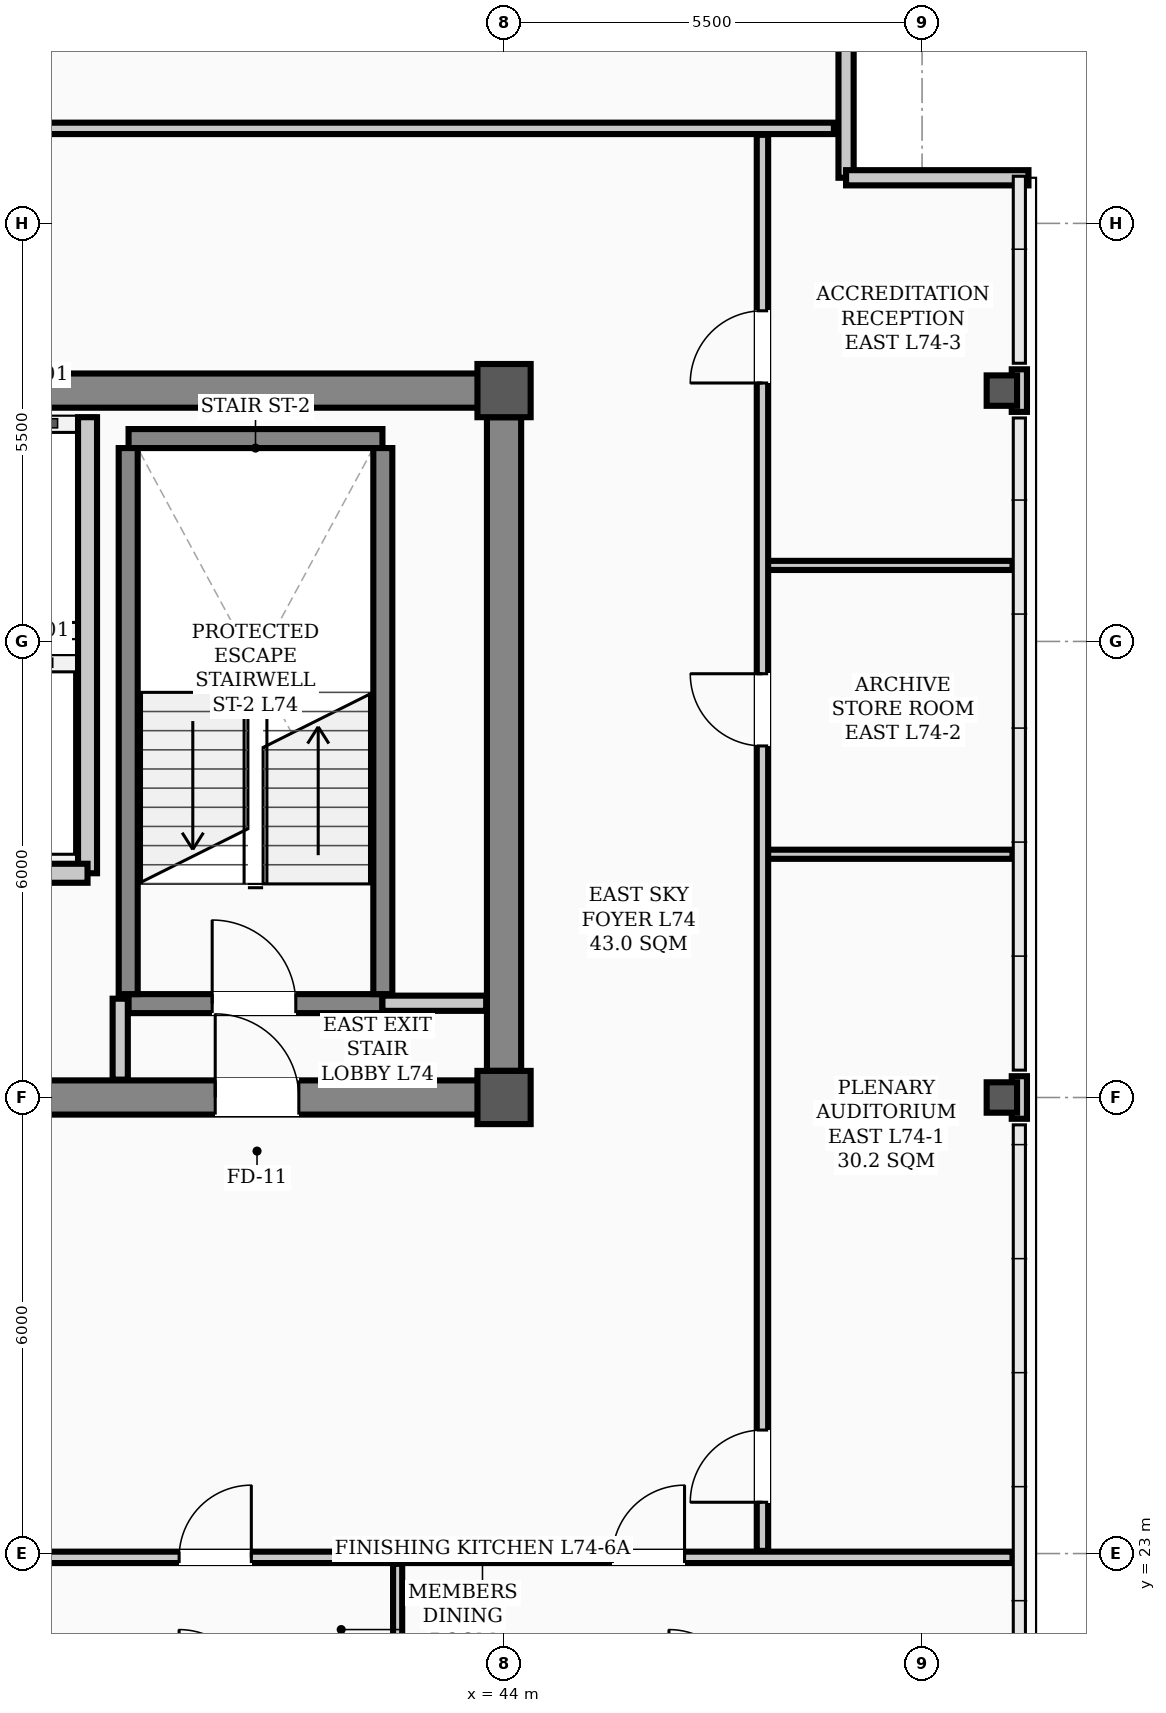
"""IFC4 building model, lengths in metres.
Left out: names, types, materials, properties, quantities, classifications, styles, units other than length and angle.
Written with IfcOpenShell. Run it as: python <this file> out.ifc"""

import sys

from ifc_helpers import new_model, si_unit, direction, frame, frame_2d, origin, origin_2d, place, context, subcontext, project, spatial, rectangle, hollow_rectangle, extrude, element, fill, save


model = new_model("IFC4")
c1 = context("Model", 3, precision=1e-05, world=origin(), true_north=direction((0.0, 1.0)))
c2 = subcontext(c1, "Body", "Model", "MODEL_VIEW")
j1 = project(units=[si_unit("LENGTHUNIT", "METRE"), si_unit("PLANEANGLEUNIT", "RADIAN")], contexts=[c1])
p1 = place(None, origin())
s1 = spatial("IfcSite", under=j1, at=p1, CompositionType="ELEMENT")
p2 = place(p1, origin())
s2 = spatial("IfcBuilding", under=s1, at=p2, CompositionType="ELEMENT")
p3 = place(p2, frame((0.0, 0.0, 296.9)))
s3 = spatial("IfcBuildingStorey", under=s2, at=p3, CompositionType="ELEMENT", Elevation=296.9)
for number, where, z_axis, x_axis in (
    (1, (44.0, 29.0, 0.0), (0.0, 0.0, 1.0), (1.0, 0.0, 0.0)),
    (2, (44.0, 38.3, 0.0), (0.0, 0.0, 1.0), (1.0, 0.0, 0.0)),
):
    element("IfcColumn", number, at=place(p3, frame(where, z_axis=z_axis, x_axis=x_axis)), inside=s3, PredefinedType="COLUMN", context=c2, shape_type="SweptSolid", body=[
        extrude(hollow_rectangle(XDim=0.7, YDim=0.7, WallThickness=0.028, InnerFilletRadius=0.014, OuterFilletRadius=0.042, at=origin_2d()), origin(), (0.0, 0.0, 1.0), 3.9),
    ])
for number, where, z_axis, x_axis in (
    (3, (50.55, 29.0, 0.0), (0.0, 0.0, 1.0), (1.0, 0.0, 0.0)),
    (4, (50.55, 38.3, 0.0), (0.0, 0.0, 1.0), (1.0, 0.0, 0.0)),
):
    element("IfcColumn", number, at=place(p3, frame(where, z_axis=z_axis, x_axis=x_axis)), inside=s3, PredefinedType="COLUMN", context=c2, shape_type="SweptSolid", body=[
        extrude(hollow_rectangle(XDim=0.4, YDim=0.4, WallThickness=0.02, InnerFilletRadius=0.02, OuterFilletRadius=0.04, at=origin_2d()), origin(), (0.0, 0.0, 1.0), 3.9),
    ])
for number, where, z_axis, x_axis in (
    (5, (50.78, 28.72, 0.0), (0.0, 0.0, 1.0), (0.0, 1.0, 0.0)),
    (6, (50.78, 38.02, 0.0), (0.0, 0.0, 1.0), (0.0, 1.0, 0.0)),
):
    element("IfcWall", number, at=place(p3, frame(where, z_axis=z_axis, x_axis=x_axis)), inside=s3, PredefinedType="PARAPET", context=c2, shape_type="SweptSolid", body=[
        extrude(rectangle(XDim=0.56, YDim=0.2, at=frame_2d((0.28, 0.0))), origin(), (0.0, 0.0, 1.0), 1.2),
    ])
for number, where, z_axis, x_axis in (
    (7, (48.5, 43.5, 0.0), (0.0, 0.0, 1.0), (0.0, -1.0, 0.0)),
    (8, (48.5, 41.1, 0.0), (0.0, 0.0, 1.0), (1.0, 0.0, 0.0)),
):
    element("IfcWall", number, at=place(p3, frame(where, z_axis=z_axis, x_axis=x_axis)), inside=s3, PredefinedType="PARAPET", context=c2, shape_type="SweptSolid", body=[
        extrude(rectangle(XDim=2.4, YDim=0.2, at=frame_2d((1.2, 0.0))), origin(), (0.0, 0.0, 1.0), 1.2),
    ])
p4 = place(p3, frame((13.5, 29.0, 0.0), z_axis=(0.0, 0.0, 1.0), x_axis=(1.0, 0.0, 0.0)))
e9 = element("IfcWall", 9, at=p4, inside=s3, PredefinedType="SHEAR", context=c2, shape_type="SweptSolid", body=[
    extrude(rectangle(XDim=30.5, YDim=0.45, at=frame_2d((15.25, 0.0))), origin(), (0.0, 0.0, 1.0), 3.72),
])
p5 = place(p4, frame((1.75, 0.0, 0.0)))
e10 = element("IfcOpeningElement", 10, at=p5, cuts=e9, PredefinedType="OPENING", context=c2, shape_type="SweptSolid", body=[
    extrude(rectangle(XDim=1.1, YDim=2.08, at=frame_2d((0.55, 1.04))), frame((0.0, 0.235, 0.0), z_axis=(0.0, -1.0, 0.0), x_axis=(1.0, 0.0, 0.0)), (0.0, 0.0, 1.0), 0.47),
])
p6 = place(p4, frame((26.7, 0.0, 0.0)))
e11 = element("IfcOpeningElement", 11, at=p6, cuts=e9, PredefinedType="OPENING", context=c2, shape_type="SweptSolid", body=[
    extrude(rectangle(XDim=1.1, YDim=2.08, at=frame_2d((0.55, 1.04))), frame((0.0, 0.235, 0.0), z_axis=(0.0, -1.0, 0.0), x_axis=(1.0, 0.0, 0.0)), (0.0, 0.0, 1.0), 0.47),
])
p7 = place(p4, frame((6.8, 0.0, 0.0)))
e12 = element("IfcOpeningElement", 12, at=p7, cuts=e9, PredefinedType="OPENING", context=c2, shape_type="SweptSolid", body=[
    extrude(rectangle(XDim=1.1, YDim=2.08, at=frame_2d((0.55, 1.04))), frame((0.0, 0.235, 0.0), z_axis=(0.0, -1.0, 0.0), x_axis=(1.0, 0.0, 0.0)), (0.0, 0.0, 1.0), 0.47),
])
p8 = place(p4, frame((13.2, 0.0, 0.0)))
e13 = element("IfcOpeningElement", 13, at=p8, cuts=e9, PredefinedType="OPENING", context=c2, shape_type="SweptSolid", body=[
    extrude(rectangle(XDim=1.6, YDim=2.08, at=frame_2d((0.8, 1.04))), frame((0.0, 0.235, 0.0), z_axis=(0.0, -1.0, 0.0), x_axis=(1.0, 0.0, 0.0)), (0.0, 0.0, 1.0), 0.47),
])
p9 = place(p4, frame((20.525, 0.0, 0.0)))
e14 = element("IfcOpeningElement", 14, at=p9, cuts=e9, PredefinedType="OPENING", context=c2, shape_type="SweptSolid", body=[
    extrude(rectangle(XDim=0.95, YDim=2.08, at=frame_2d((0.475, 1.04))), frame((0.0, 0.235, 0.0), z_axis=(0.0, -1.0, 0.0), x_axis=(1.0, 0.0, 0.0)), (0.0, 0.0, 1.0), 0.47),
])
p10 = place(p3, frame((13.5, 38.3, 0.0), z_axis=(0.0, 0.0, 1.0), x_axis=(1.0, 0.0, 0.0)))
e15 = element("IfcWall", 15, at=p10, inside=s3, PredefinedType="SHEAR", context=c2, shape_type="SweptSolid", body=[
    extrude(rectangle(XDim=30.5, YDim=0.45, at=frame_2d((15.25, 0.0))), origin(), (0.0, 0.0, 1.0), 3.72),
])
p11 = place(p3, frame((44.0, 29.35, 0.0), z_axis=(0.0, 0.0, 1.0), x_axis=(0.0, 1.0, 0.0)))
e16 = element("IfcWall", 16, at=p11, inside=s3, PredefinedType="SHEAR", context=c2, shape_type="SweptSolid", body=[
    extrude(rectangle(XDim=8.6, YDim=0.45, at=frame_2d((4.3, 0.0))), origin(), (0.0, 0.0, 1.0), 3.72),
])
p12 = place(p3, frame((39.06, 30.235, 0.0), z_axis=(0.0, 0.0, 1.0), x_axis=(1.0, 0.0, 0.0)))
e17 = element("IfcWall", 17, at=p12, inside=s3, PredefinedType="STANDARD", context=c2, shape_type="SweptSolid", body=[
    extrude(rectangle(XDim=3.34, YDim=0.25, at=frame_2d((1.67, 0.0))), origin(), (0.0, 0.0, 1.0), 3.72),
])
p13 = place(p12, frame((1.1, 0.0, 0.0)))
e18 = element("IfcOpeningElement", 18, at=p13, cuts=e17, PredefinedType="OPENING", context=c2, shape_type="SweptSolid", body=[
    extrude(rectangle(XDim=1.1, YDim=2.08, at=frame_2d((0.55, 1.04))), frame((0.0, 0.135, 0.0), z_axis=(0.0, -1.0, 0.0), x_axis=(1.0, 0.0, 0.0)), (0.0, 0.0, 1.0), 0.27),
])
p14 = place(p3, frame((39.06, 37.669, 0.0), z_axis=(0.0, 0.0, 1.0), x_axis=(1.0, 0.0, 0.0)))
e19 = element("IfcWall", 19, at=p14, inside=s3, PredefinedType="STANDARD", context=c2, shape_type="SweptSolid", body=[
    extrude(rectangle(XDim=3.34, YDim=0.25, at=frame_2d((1.67, 0.0))), origin(), (0.0, 0.0, 1.0), 3.72),
])
for number, where, z_axis, x_axis in (
    (20, (39.055, 30.36, 0.0), (0.0, 0.0, 1.0), (0.0, 1.0, 0.0)),
    (21, (42.405, 30.36, 0.0), (0.0, 0.0, 1.0), (0.0, 1.0, 0.0)),
):
    element("IfcWall", number, at=place(p3, frame(where, z_axis=z_axis, x_axis=x_axis)), inside=s3, PredefinedType="STANDARD", context=c2, shape_type="SweptSolid", body=[
        extrude(rectangle(XDim=7.184, YDim=0.25, at=frame_2d((3.592, 0.0))), origin(), (0.0, 0.0, 1.0), 3.72),
    ])
p15 = place(p3, frame((38.52, 31.95, 0.0), z_axis=(0.0, 0.0, 1.0), x_axis=(0.0, 1.0, 0.0)))
e22 = element("IfcWall", 22, at=p15, inside=s3, PredefinedType="STANDARD", context=c2, shape_type="SweptSolid", body=[
    extrude(rectangle(XDim=6.0, YDim=0.25, at=frame_2d((3.0, 0.0))), origin(), (0.0, 0.0, 1.0), 3.4),
])
p16 = place(p3, frame((36.62, 31.95, 0.0), z_axis=(0.0, 0.0, 1.0), x_axis=(1.0, 0.0, 0.0)))
e23 = element("IfcWall", 23, at=p16, inside=s3, PredefinedType="STANDARD", context=c2, shape_type="SweptSolid", body=[
    extrude(rectangle(XDim=1.9, YDim=0.25, at=frame_2d((0.95, 0.0))), origin(), (0.0, 0.0, 1.0), 3.48),
])
p17 = place(p3, frame((42.4, 30.24, 0.0), z_axis=(0.0, 0.0, 1.0), x_axis=(1.0, 0.0, 0.0)))
e24 = element("IfcWall", 24, at=p17, inside=s3, PredefinedType="STANDARD", context=c2, shape_type="SweptSolid", body=[
    extrude(rectangle(XDim=1.365, YDim=0.2, at=frame_2d((0.683, 0.0))), origin(), (0.0, 0.0, 1.0), 3.2),
])
p18 = place(p3, frame((12.31, 22.95, 0.0), z_axis=(0.0, 0.0, 1.0), x_axis=(1.0, 0.0, 0.0)))
e25 = element("IfcWall", 25, at=p18, inside=s3, PredefinedType="PARTITIONING", context=c2, shape_type="SweptSolid", body=[
    extrude(rectangle(XDim=38.38, YDim=0.15, at=frame_2d((19.19, 0.0))), origin(), (0.0, 0.0, 1.0), 3.2),
])
p19 = place(p18, frame((3.47, 0.0, 0.0)))
e26 = element("IfcOpeningElement", 26, at=p19, cuts=e25, PredefinedType="OPENING", context=c2, shape_type="SweptSolid", body=[
    extrude(rectangle(XDim=0.95, YDim=2.08, at=frame_2d((0.475, 1.04))), frame((0.0, 0.085, 0.0), z_axis=(0.0, -1.0, 0.0), x_axis=(1.0, 0.0, 0.0)), (0.0, 0.0, 1.0), 0.17),
])
p20 = place(p18, frame((9.615, 0.0, 0.0)))
e27 = element("IfcOpeningElement", 27, at=p20, cuts=e25, PredefinedType="OPENING", context=c2, shape_type="SweptSolid", body=[
    extrude(rectangle(XDim=0.95, YDim=2.08, at=frame_2d((0.475, 1.04))), frame((0.0, 0.085, 0.0), z_axis=(0.0, -1.0, 0.0), x_axis=(1.0, 0.0, 0.0)), (0.0, 0.0, 1.0), 0.17),
])
p21 = place(p18, frame((15.415, 0.0, 0.0)))
e28 = element("IfcOpeningElement", 28, at=p21, cuts=e25, PredefinedType="OPENING", context=c2, shape_type="SweptSolid", body=[
    extrude(rectangle(XDim=0.95, YDim=2.08, at=frame_2d((0.475, 1.04))), frame((0.0, 0.085, 0.0), z_axis=(0.0, -1.0, 0.0), x_axis=(1.0, 0.0, 0.0)), (0.0, 0.0, 1.0), 0.17),
])
p22 = place(p18, frame((22.015, 0.0, 0.0)))
e29 = element("IfcOpeningElement", 29, at=p22, cuts=e25, PredefinedType="OPENING", context=c2, shape_type="SweptSolid", body=[
    extrude(rectangle(XDim=0.95, YDim=2.08, at=frame_2d((0.475, 1.04))), frame((0.0, 0.085, 0.0), z_axis=(0.0, -1.0, 0.0), x_axis=(1.0, 0.0, 0.0)), (0.0, 0.0, 1.0), 0.17),
])
p23 = place(p18, frame((27.415, 0.0, 0.0)))
e30 = element("IfcOpeningElement", 30, at=p23, cuts=e25, PredefinedType="OPENING", context=c2, shape_type="SweptSolid", body=[
    extrude(rectangle(XDim=0.95, YDim=2.08, at=frame_2d((0.475, 1.04))), frame((0.0, 0.085, 0.0), z_axis=(0.0, -1.0, 0.0), x_axis=(1.0, 0.0, 0.0)), (0.0, 0.0, 1.0), 0.17),
])
p24 = place(p18, frame((33.115, 0.0, 0.0)))
e31 = element("IfcOpeningElement", 31, at=p24, cuts=e25, PredefinedType="OPENING", context=c2, shape_type="SweptSolid", body=[
    extrude(rectangle(XDim=0.95, YDim=2.08, at=frame_2d((0.475, 1.04))), frame((0.0, 0.085, 0.0), z_axis=(0.0, -1.0, 0.0), x_axis=(1.0, 0.0, 0.0)), (0.0, 0.0, 1.0), 0.17),
])
for number, where, z_axis, x_axis in (
    (32, (47.4, 32.2, 0.0), (0.0, 0.0, 1.0), (1.0, 0.0, 0.0)),
    (33, (47.4, 36.0, 0.0), (0.0, 0.0, 1.0), (1.0, 0.0, 0.0)),
):
    element("IfcWall", number, at=place(p3, frame(where, z_axis=z_axis, x_axis=x_axis)), inside=s3, PredefinedType="PARTITIONING", context=c2, shape_type="SweptSolid", body=[
        extrude(rectangle(XDim=3.29, YDim=0.12, at=frame_2d((1.645, 0.0))), origin(), (0.0, 0.0, 1.0), 3.212),
    ])
p25 = place(p3, frame((14.66, 41.75, 0.0), z_axis=(0.0, 0.0, 1.0), x_axis=(1.0, 0.0, 0.0)))
e34 = element("IfcWall", 34, at=p25, inside=s3, PredefinedType="PARTITIONING", context=c2, shape_type="SweptSolid", body=[
    extrude(rectangle(XDim=33.68, YDim=0.15, at=frame_2d((16.84, 0.0))), origin(), (0.0, 0.0, 1.0), 3.2),
])
p26 = place(p3, frame((38.95, 29.235, 0.0), z_axis=(0.0, 0.0, 1.0), x_axis=(0.0, 1.0, 0.0)))
e35 = element("IfcWall", 35, at=p26, inside=s3, PredefinedType="STANDARD", context=c2, shape_type="SweptSolid", body=[
    extrude(rectangle(XDim=1.065, YDim=0.2, at=frame_2d((0.532, 0.0))), origin(), (0.0, 0.0, 1.0), 3.4),
])
p27 = place(p3, frame((47.4, 23.035, 0.0), z_axis=(0.0, 0.0, 1.0), x_axis=(0.0, 1.0, 0.0)))
e36 = element("IfcWall", 36, at=p27, inside=s3, PredefinedType="PARTITIONING", context=c2, shape_type="SweptSolid", body=[
    extrude(rectangle(XDim=18.63, YDim=0.15, at=frame_2d((9.315, 0.0))), origin(), (0.0, 0.0, 1.0), 3.1),
])
p28 = place(p27, frame((0.64, 0.0, 0.0)))
e37 = element("IfcOpeningElement", 37, at=p28, cuts=e36, PredefinedType="OPENING", context=c2, shape_type="SweptSolid", body=[
    extrude(rectangle(XDim=0.95, YDim=2.08, at=frame_2d((0.475, 1.04))), frame((0.0, 0.085, 0.0), z_axis=(0.0, -1.0, 0.0), x_axis=(1.0, 0.0, 0.0)), (0.0, 0.0, 1.0), 0.17),
])
p29 = place(p27, frame((10.59, 0.0, 0.0)))
e38 = element("IfcOpeningElement", 38, at=p29, cuts=e36, PredefinedType="OPENING", context=c2, shape_type="SweptSolid", body=[
    extrude(rectangle(XDim=0.95, YDim=2.08, at=frame_2d((0.475, 1.04))), frame((0.0, 0.085, 0.0), z_axis=(0.0, -1.0, 0.0), x_axis=(1.0, 0.0, 0.0)), (0.0, 0.0, 1.0), 0.17),
])
p30 = place(p27, frame((15.365, 0.0, 0.0)))
e39 = element("IfcOpeningElement", 39, at=p30, cuts=e36, PredefinedType="OPENING", context=c2, shape_type="SweptSolid", body=[
    extrude(rectangle(XDim=0.95, YDim=2.08, at=frame_2d((0.475, 1.04))), frame((0.0, 0.085, 0.0), z_axis=(0.0, -1.0, 0.0), x_axis=(1.0, 0.0, 0.0)), (0.0, 0.0, 1.0), 0.17),
])
p31 = place(p3, frame((42.6, 18.71, 0.0), z_axis=(0.0, 0.0, 1.0), x_axis=(0.0, 1.0, 0.0)))
e40 = element("IfcWall", 40, at=p31, inside=s3, PredefinedType="PARTITIONING", context=c2, shape_type="SweptSolid", body=[
    extrude(rectangle(XDim=4.155, YDim=0.12, at=frame_2d((2.078, 0.0))), origin(), (0.0, 0.0, 1.0), 3.1),
])
p32 = place(p13, origin())
e41 = element("IfcDoor", 41, at=p32, inside=s3, OperationType="SINGLE_SWING_LEFT", PredefinedType="DOOR", context=c2, shape_type="SweptSolid", body=[
    extrude(rectangle(XDim=1.1, YDim=2.08, at=frame_2d((0.55, 1.04))), frame((0.0, 0.025, 0.0), z_axis=(0.0, -1.0, 0.0), x_axis=(1.0, 0.0, 0.0)), (0.0, 0.0, 1.0), 0.05),
])
fill(e18, e41)
p33 = place(p6, origin())
e42 = element("IfcDoor", 42, at=p33, inside=s3, OperationType="SINGLE_SWING_LEFT", PredefinedType="DOOR", context=c2, shape_type="SweptSolid", body=[
    extrude(rectangle(XDim=1.1, YDim=2.08, at=frame_2d((0.55, 1.04))), frame((0.0, 0.025, 0.0), z_axis=(0.0, -1.0, 0.0), x_axis=(1.0, 0.0, 0.0)), (0.0, 0.0, 1.0), 0.05),
])
fill(e11, e42)
p34 = place(p23, origin())
e43 = element("IfcDoor", 43, at=p34, inside=s3, OperationType="SINGLE_SWING_RIGHT", PredefinedType="DOOR", context=c2, shape_type="SweptSolid", body=[
    extrude(rectangle(XDim=0.95, YDim=2.08, at=frame_2d((0.475, 1.04))), frame((0.0, 0.025, 0.0), z_axis=(0.0, -1.0, 0.0), x_axis=(1.0, 0.0, 0.0)), (0.0, 0.0, 1.0), 0.05),
])
fill(e30, e43)
p35 = place(p24, origin())
e44 = element("IfcDoor", 44, at=p35, inside=s3, OperationType="SINGLE_SWING_RIGHT", PredefinedType="DOOR", context=c2, shape_type="SweptSolid", body=[
    extrude(rectangle(XDim=0.95, YDim=2.08, at=frame_2d((0.475, 1.04))), frame((0.0, 0.025, 0.0), z_axis=(0.0, -1.0, 0.0), x_axis=(1.0, 0.0, 0.0)), (0.0, 0.0, 1.0), 0.05),
])
fill(e31, e44)
p36 = place(p28, origin())
e45 = element("IfcDoor", 45, at=p36, inside=s3, OperationType="SINGLE_SWING_LEFT", PredefinedType="DOOR", context=c2, shape_type="SweptSolid", body=[
    extrude(rectangle(XDim=0.95, YDim=2.08, at=frame_2d((0.475, 1.04))), frame((0.0, 0.025, 0.0), z_axis=(0.0, -1.0, 0.0), x_axis=(1.0, 0.0, 0.0)), (0.0, 0.0, 1.0), 0.05),
])
fill(e37, e45)
p37 = place(p29, origin())
e46 = element("IfcDoor", 46, at=p37, inside=s3, OperationType="SINGLE_SWING_RIGHT", PredefinedType="DOOR", context=c2, shape_type="SweptSolid", body=[
    extrude(rectangle(XDim=0.95, YDim=2.08, at=frame_2d((0.475, 1.04))), frame((0.0, 0.025, 0.0), z_axis=(0.0, -1.0, 0.0), x_axis=(1.0, 0.0, 0.0)), (0.0, 0.0, 1.0), 0.05),
])
fill(e38, e46)
p38 = place(p30, origin())
e47 = element("IfcDoor", 47, at=p38, inside=s3, OperationType="SINGLE_SWING_LEFT", PredefinedType="DOOR", context=c2, shape_type="SweptSolid", body=[
    extrude(rectangle(XDim=0.95, YDim=2.08, at=frame_2d((0.475, 1.04))), frame((0.0, 0.025, 0.0), z_axis=(0.0, -1.0, 0.0), x_axis=(1.0, 0.0, 0.0)), (0.0, 0.0, 1.0), 0.05),
])
fill(e39, e47)
save(model, sys.argv[1])
